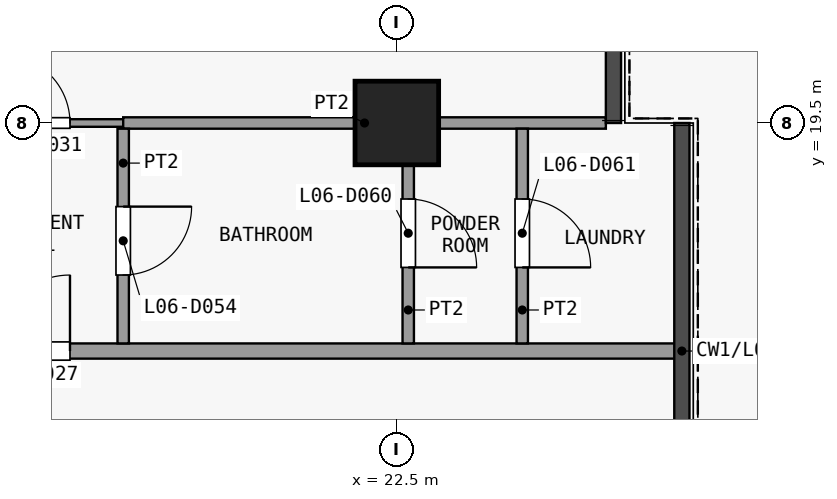
"""IFC4 building model, lengths in metres.
Left out: names, types, materials, properties, quantities, classifications, styles, units other than length and angle.
Written with IfcOpenShell. Run it as: python <this file> out.ifc"""

import sys

from ifc_helpers import new_model, si_unit, direction, frame, frame_2d, origin, origin_2d, place, context, subcontext, project, spatial, rectangle, extrude, element, fill, save


model = new_model("IFC4")
c1 = context("Model", 3, precision=1e-05, world=origin(), true_north=direction((0.0, 1.0)))
c2 = subcontext(c1, "Body", "Model", "MODEL_VIEW")
j1 = project(units=[si_unit("LENGTHUNIT", "METRE"), si_unit("PLANEANGLEUNIT", "RADIAN")], contexts=[c1])
p1 = place(None, origin())
s1 = spatial("IfcSite", under=j1, at=p1, CompositionType="ELEMENT")
p2 = place(p1, origin())
s2 = spatial("IfcBuilding", under=s1, at=p2, CompositionType="ELEMENT")
p3 = place(p2, frame((0.0, 0.0, 32.5)))
s3 = spatial("IfcBuildingStorey", under=s2, at=p3, CompositionType="ELEMENT", Elevation=32.5)
p4 = place(p3, frame((22.5, 19.5, 0.0), z_axis=(0.0, 0.0, 1.0), x_axis=(1.0, 0.0, 0.0)))
e1 = element("IfcColumn", 1, at=p4, inside=s3, PredefinedType="COLUMN", context=c2, shape_type="SweptSolid", body=[
    extrude(rectangle(XDim=1.1, YDim=1.1, at=origin_2d()), origin(), (0.0, 0.0, 1.0), 3.6),
])
p5 = place(p3, frame((-25.35, 16.5, 0.0), z_axis=(0.0, 0.0, 1.0), x_axis=(1.0, 0.0, 0.0)))
e2 = element("IfcWall", 2, at=p5, inside=s3, PredefinedType="PARTITIONING", context=c2, shape_type="SweptSolid", body=[
    extrude(rectangle(XDim=51.6, YDim=0.2, at=frame_2d((25.8, 0.0))), origin(), (0.0, 0.0, 1.0), 3.3),
])
p6 = place(p5, frame((4.55, 0.0, 0.0)))
e3 = element("IfcOpeningElement", 3, at=p6, cuts=e2, PredefinedType="OPENING", context=c2, shape_type="SweptSolid", body=[
    extrude(rectangle(XDim=1.0, YDim=2.1, at=frame_2d((0.5, 1.05))), frame((0.0, 0.11, 0.0), z_axis=(0.0, -1.0, 0.0), x_axis=(1.0, 0.0, 0.0)), (0.0, 0.0, 1.0), 0.22),
])
p7 = place(p5, frame((11.35, 0.0, 0.0)))
e4 = element("IfcOpeningElement", 4, at=p7, cuts=e2, PredefinedType="OPENING", context=c2, shape_type="SweptSolid", body=[
    extrude(rectangle(XDim=0.9, YDim=2.1, at=frame_2d((0.45, 1.05))), frame((0.0, 0.11, 0.0), z_axis=(0.0, -1.0, 0.0), x_axis=(1.0, 0.0, 0.0)), (0.0, 0.0, 1.0), 0.22),
])
p8 = place(p5, frame((17.35, 0.0, 0.0)))
e5 = element("IfcOpeningElement", 5, at=p8, cuts=e2, PredefinedType="OPENING", context=c2, shape_type="SweptSolid", body=[
    extrude(rectangle(XDim=0.9, YDim=2.1, at=frame_2d((0.45, 1.05))), frame((0.0, 0.11, 0.0), z_axis=(0.0, -1.0, 0.0), x_axis=(1.0, 0.0, 0.0)), (0.0, 0.0, 1.0), 0.22),
])
p9 = place(p5, frame((24.05, 0.0, 0.0)))
e6 = element("IfcOpeningElement", 6, at=p9, cuts=e2, PredefinedType="OPENING", context=c2, shape_type="SweptSolid", body=[
    extrude(rectangle(XDim=1.0, YDim=2.1, at=frame_2d((0.5, 1.05))), frame((0.0, 0.11, 0.0), z_axis=(0.0, -1.0, 0.0), x_axis=(1.0, 0.0, 0.0)), (0.0, 0.0, 1.0), 0.22),
])
p10 = place(p5, frame((30.55, 0.0, 0.0)))
e7 = element("IfcOpeningElement", 7, at=p10, cuts=e2, PredefinedType="OPENING", context=c2, shape_type="SweptSolid", body=[
    extrude(rectangle(XDim=1.0, YDim=2.1, at=frame_2d((0.5, 1.05))), frame((0.0, 0.11, 0.0), z_axis=(0.0, -1.0, 0.0), x_axis=(1.0, 0.0, 0.0)), (0.0, 0.0, 1.0), 0.22),
])
p11 = place(p5, frame((42.55, 0.0, 0.0)))
e8 = element("IfcOpeningElement", 8, at=p11, cuts=e2, PredefinedType="OPENING", context=c2, shape_type="SweptSolid", body=[
    extrude(rectangle(XDim=1.0, YDim=2.1, at=frame_2d((0.5, 1.05))), frame((0.0, 0.11, 0.0), z_axis=(0.0, -1.0, 0.0), x_axis=(1.0, 0.0, 0.0)), (0.0, 0.0, 1.0), 0.22),
])
p12 = place(p3, frame((16.5, 19.5, 0.0), z_axis=(0.0, 0.0, 1.0), x_axis=(1.0, 0.0, 0.0)))
e9 = element("IfcWall", 9, at=p12, inside=s3, PredefinedType="PARTITIONING", context=c2, shape_type="SweptSolid", body=[
    extrude(rectangle(XDim=2.4, YDim=0.1, at=frame_2d((1.2, 0.0))), origin(), (0.0, 0.0, 1.0), 3.3),
])
p13 = place(p12, frame((0.8, 0.0, 0.0)))
e10 = element("IfcOpeningElement", 10, at=p13, cuts=e9, PredefinedType="OPENING", context=c2, shape_type="SweptSolid", body=[
    extrude(rectangle(XDim=0.9, YDim=2.1, at=frame_2d((0.45, 1.05))), frame((0.0, 0.06, 0.0), z_axis=(0.0, -1.0, 0.0), x_axis=(1.0, 0.0, 0.0)), (0.0, 0.0, 1.0), 0.12),
])
p14 = place(p3, frame((18.9, 19.5, 0.0), z_axis=(0.0, 0.0, 1.0), x_axis=(1.0, 0.0, 0.0)))
e11 = element("IfcWall", 11, at=p14, inside=s3, PredefinedType="PARTITIONING", context=c2, shape_type="SweptSolid", body=[
    extrude(rectangle(XDim=6.35, YDim=0.15, at=frame_2d((3.175, 0.0))), origin(), (0.0, 0.0, 1.0), 3.3),
])
p15 = place(p3, frame((18.9, 16.6, 0.0), z_axis=(0.0, 0.0, 1.0), x_axis=(0.0, 1.0, 0.0)))
e12 = element("IfcWall", 12, at=p15, inside=s3, PredefinedType="PARTITIONING", context=c2, shape_type="SweptSolid", body=[
    extrude(rectangle(XDim=2.825, YDim=0.15, at=frame_2d((1.413, 0.0))), origin(), (0.0, 0.0, 1.0), 3.3),
])
p16 = place(p15, frame((0.9, 0.0, 0.0)))
e13 = element("IfcOpeningElement", 13, at=p16, cuts=e12, PredefinedType="OPENING", context=c2, shape_type="SweptSolid", body=[
    extrude(rectangle(XDim=0.9, YDim=2.1, at=frame_2d((0.45, 1.05))), frame((0.0, 0.085, 0.0), z_axis=(0.0, -1.0, 0.0), x_axis=(1.0, 0.0, 0.0)), (0.0, 0.0, 1.0), 0.17),
])
p17 = place(p3, frame((22.65, 16.6, 0.0), z_axis=(0.0, 0.0, 1.0), x_axis=(0.0, 1.0, 0.0)))
e14 = element("IfcWall", 14, at=p17, inside=s3, PredefinedType="PARTITIONING", context=c2, shape_type="SweptSolid", body=[
    extrude(rectangle(XDim=2.825, YDim=0.15, at=frame_2d((1.413, 0.0))), origin(), (0.0, 0.0, 1.0), 3.3),
])
p18 = place(p17, frame((1.0, 0.0, 0.0)))
e15 = element("IfcOpeningElement", 15, at=p18, cuts=e14, PredefinedType="OPENING", context=c2, shape_type="SweptSolid", body=[
    extrude(rectangle(XDim=0.9, YDim=2.1, at=frame_2d((0.45, 1.05))), frame((0.0, 0.085, 0.0), z_axis=(0.0, -1.0, 0.0), x_axis=(1.0, 0.0, 0.0)), (0.0, 0.0, 1.0), 0.17),
])
p19 = place(p3, frame((24.15, 16.6, 0.0), z_axis=(0.0, 0.0, 1.0), x_axis=(0.0, 1.0, 0.0)))
e16 = element("IfcWall", 16, at=p19, inside=s3, PredefinedType="PARTITIONING", context=c2, shape_type="SweptSolid", body=[
    extrude(rectangle(XDim=2.825, YDim=0.15, at=frame_2d((1.413, 0.0))), origin(), (0.0, 0.0, 1.0), 3.3),
])
p20 = place(p19, frame((1.0, 0.0, 0.0)))
e17 = element("IfcOpeningElement", 17, at=p20, cuts=e16, PredefinedType="OPENING", context=c2, shape_type="SweptSolid", body=[
    extrude(rectangle(XDim=0.9, YDim=2.1, at=frame_2d((0.45, 1.05))), frame((0.0, 0.085, 0.0), z_axis=(0.0, -1.0, 0.0), x_axis=(1.0, 0.0, 0.0)), (0.0, 0.0, 1.0), 0.17),
])
p21 = place(p11, origin())
e18 = element("IfcDoor", 18, at=p21, inside=s3, OperationType="SINGLE_SWING_LEFT", PredefinedType="DOOR", context=c2, shape_type="SweptSolid", body=[
    extrude(rectangle(XDim=1.0, YDim=2.1, at=frame_2d((0.5, 1.05))), frame((0.0, 0.025, 0.0), z_axis=(0.0, -1.0, 0.0), x_axis=(1.0, 0.0, 0.0)), (0.0, 0.0, 1.0), 0.05),
])
fill(e8, e18)
p22 = place(p13, origin())
e19 = element("IfcDoor", 19, at=p22, inside=s3, OperationType="SINGLE_SWING_RIGHT", PredefinedType="DOOR", context=c2, shape_type="SweptSolid", body=[
    extrude(rectangle(XDim=0.9, YDim=2.1, at=frame_2d((0.45, 1.05))), frame((0.0, 0.025, 0.0), z_axis=(0.0, -1.0, 0.0), x_axis=(1.0, 0.0, 0.0)), (0.0, 0.0, 1.0), 0.05),
])
fill(e10, e19)
p23 = place(p16, origin())
e20 = element("IfcDoor", 20, at=p23, inside=s3, OperationType="SINGLE_SWING_RIGHT", PredefinedType="DOOR", context=c2, shape_type="SweptSolid", body=[
    extrude(rectangle(XDim=0.9, YDim=2.1, at=frame_2d((0.45, 1.05))), frame((0.0, 0.025, 0.0), z_axis=(0.0, -1.0, 0.0), x_axis=(1.0, 0.0, 0.0)), (0.0, 0.0, 1.0), 0.05),
])
fill(e13, e20)
p24 = place(p18, origin())
e21 = element("IfcDoor", 21, at=p24, inside=s3, OperationType="SINGLE_SWING_LEFT", PredefinedType="DOOR", context=c2, shape_type="SweptSolid", body=[
    extrude(rectangle(XDim=0.9, YDim=2.1, at=frame_2d((0.45, 1.05))), frame((0.0, 0.025, 0.0), z_axis=(0.0, -1.0, 0.0), x_axis=(1.0, 0.0, 0.0)), (0.0, 0.0, 1.0), 0.05),
])
fill(e15, e21)
p25 = place(p20, origin())
e22 = element("IfcDoor", 22, at=p25, inside=s3, OperationType="SINGLE_SWING_LEFT", PredefinedType="DOOR", context=c2, shape_type="SweptSolid", body=[
    extrude(rectangle(XDim=0.9, YDim=2.1, at=frame_2d((0.45, 1.05))), frame((0.0, 0.025, 0.0), z_axis=(0.0, -1.0, 0.0), x_axis=(1.0, 0.0, 0.0)), (0.0, 0.0, 1.0), 0.05),
])
fill(e17, e22)
save(model, sys.argv[1])
